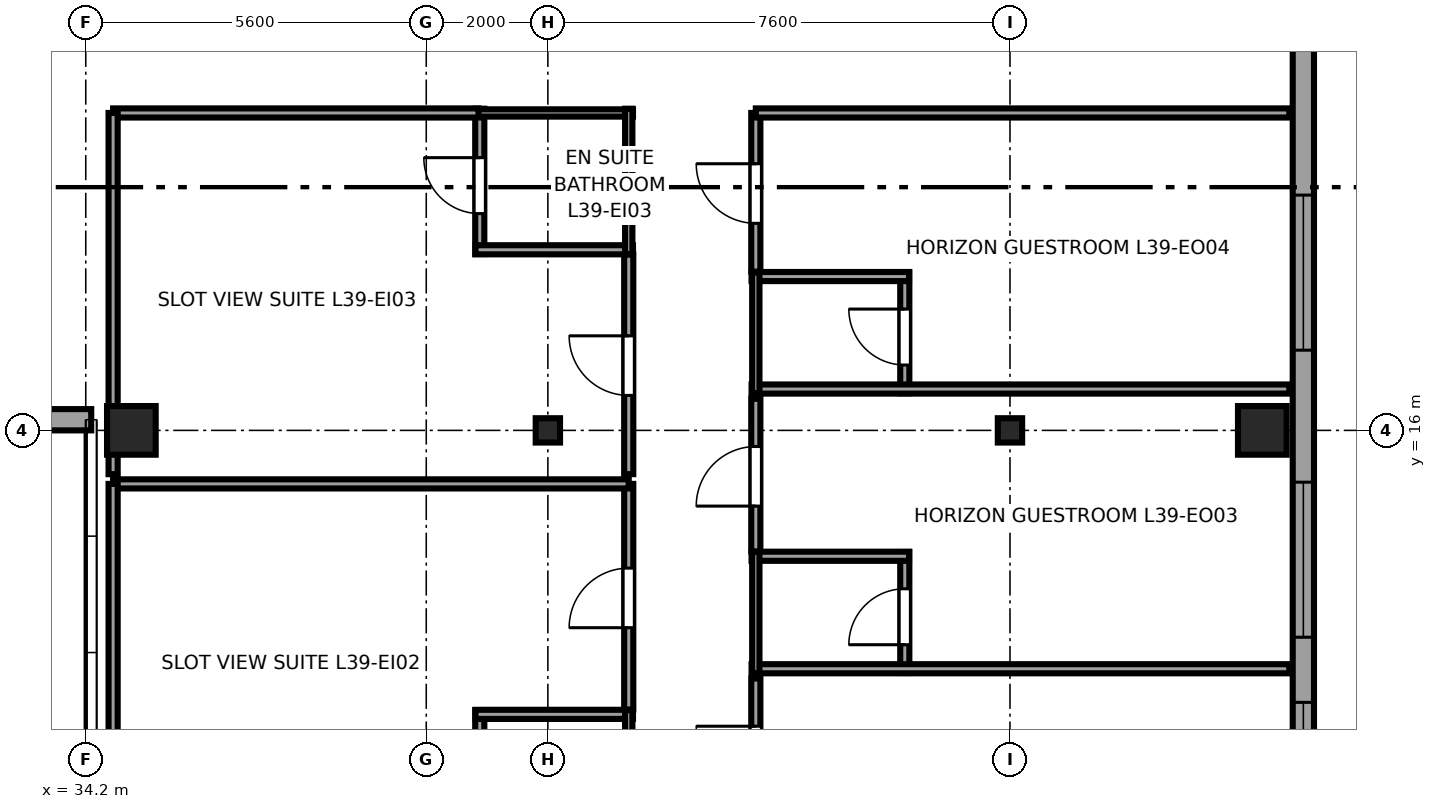
"""IFC4 building model, lengths in metres.
Left out: names, types, materials, properties, quantities, classifications, styles, units other than length and angle.
Written with IfcOpenShell. Run it as: python <this file> out.ifc"""

import sys

from ifc_helpers import new_model, si_unit, direction, frame, frame_2d, origin, origin_2d, place, context, subcontext, project, spatial, rectangle, i_section, extrude, source, transform, mapped, element, fill, save


model = new_model("IFC4")
c1 = context("Model", 3, precision=1e-05, world=origin(), true_north=direction((0.0, 1.0)))
c2 = subcontext(c1, "Body", "Model", "MODEL_VIEW")
j1 = project(units=[si_unit("LENGTHUNIT", "METRE"), si_unit("PLANEANGLEUNIT", "RADIAN")], contexts=[c1])
p1 = place(None, origin())
s1 = spatial("IfcSite", under=j1, at=p1, CompositionType="ELEMENT")
p2 = place(p1, origin())
s2 = spatial("IfcBuilding", under=s1, at=p2, CompositionType="ELEMENT")
p3 = place(p2, frame((0.0, 0.0, 150.6)))
s3 = spatial("IfcBuildingStorey", under=s2, at=p3, CompositionType="ELEMENT", Elevation=150.6)
m1 = source(origin(), c2, "Body", "SweptSolid", [
    extrude(rectangle(XDim=0.8, YDim=0.8, at=origin_2d()), origin(), (0.0, 0.0, 1.0), 3.55),
])
p4 = place(p3, frame((34.95, 16.0, 0.0), z_axis=(0.0, 0.0, 1.0), x_axis=(1.0, 0.0, 0.0)))
e1 = element("IfcColumn", 1, at=p4, inside=s3, PredefinedType="COLUMN", context=c2, shape_type="MappedRepresentation", body=[
    mapped(m1, transform((0.0, 0.0, 0.0), x_axis=(1.0, 0.0, 0.0), y_axis=(0.0, 1.0, 0.0), z_axis=(0.0, 0.0, 1.0), scale=1.0)),
])
m2 = source(origin(), c2, "Body", "SweptSolid", [
    extrude(i_section(OverallWidth=0.4, OverallDepth=0.4, WebThickness=0.02, FlangeThickness=0.035, at=origin_2d()), origin(), (0.0, 0.0, 1.0), 3.55),
])
for number, where, z_axis, x_axis in (
    (2, (41.8, 16.0, 0.0), (0.0, 0.0, 1.0), (1.0, 0.0, 0.0)),
    (3, (49.4, 16.0, 0.0), (0.0, 0.0, 1.0), (1.0, 0.0, 0.0)),
):
    element("IfcColumn", number, at=place(p3, frame(where, z_axis=z_axis, x_axis=x_axis)), inside=s3, PredefinedType="COLUMN", context=c2, shape_type="MappedRepresentation", body=[
        mapped(m2, transform((0.0, 0.0, 0.0), x_axis=(1.0, 0.0, 0.0), y_axis=(0.0, 1.0, 0.0), z_axis=(0.0, 0.0, 1.0), scale=1.0)),
    ])
p5 = place(p3, frame((53.55, 16.0, 0.0), z_axis=(0.0, 0.0, 1.0), x_axis=(1.0, 0.0, 0.0)))
e4 = element("IfcColumn", 4, at=p5, inside=s3, PredefinedType="COLUMN", context=c2, shape_type="MappedRepresentation", body=[
    mapped(m1, transform((0.0, 0.0, 0.0), x_axis=(1.0, 0.0, 0.0), y_axis=(0.0, 1.0, 0.0), z_axis=(0.0, 0.0, 1.0), scale=1.0)),
])
p6 = place(p3, frame((22.71, 16.175, 0.0), z_axis=(0.0, 0.0, 1.0), x_axis=(1.0, 0.0, 0.0)))
e5 = element("IfcWall", 5, at=p6, inside=s3, PredefinedType="SOLIDWALL", context=c2, shape_type="SweptSolid", body=[
    extrude(rectangle(XDim=11.58, YDim=0.35, at=frame_2d((5.79, 0.0))), origin(), (0.0, 0.0, 1.0), 2.16),
])
p7 = place(p3, frame((54.225, 7.017, 0.0), z_axis=(0.0, 0.0, 1.0), x_axis=(0.0, 1.0, 0.0)))
e6 = element("IfcWall", 6, at=p7, inside=s3, PredefinedType="SOLIDWALL", context=c2, shape_type="SweptSolid", body=[
    extrude(rectangle(XDim=34.566, YDim=0.35, at=frame_2d((17.283, 0.0))), origin(), (0.0, 0.0, 1.0), 3.37),
])
p8 = place(p7, frame((1.96, 0.0, 0.68)))
e7 = element("IfcOpeningElement", 7, at=p8, cuts=e6, PredefinedType="OPENING", context=c2, shape_type="SweptSolid", body=[
    extrude(rectangle(XDim=2.55, YDim=1.92, at=frame_2d((1.275, 0.96))), frame((0.0, 0.185, 0.0), z_axis=(0.0, -1.0, 0.0), x_axis=(1.0, 0.0, 0.0)), (0.0, 0.0, 1.0), 0.37),
])
p9 = place(p7, frame((5.581, 0.0, 0.68)))
e8 = element("IfcOpeningElement", 8, at=p9, cuts=e6, PredefinedType="OPENING", context=c2, shape_type="SweptSolid", body=[
    extrude(rectangle(XDim=2.55, YDim=1.92, at=frame_2d((1.275, 0.96))), frame((0.0, 0.185, 0.0), z_axis=(0.0, -1.0, 0.0), x_axis=(1.0, 0.0, 0.0)), (0.0, 0.0, 1.0), 0.37),
])
p10 = place(p7, frame((10.302, 0.0, 0.68)))
e9 = element("IfcOpeningElement", 9, at=p10, cuts=e6, PredefinedType="OPENING", context=c2, shape_type="SweptSolid", body=[
    extrude(rectangle(XDim=2.55, YDim=1.92, at=frame_2d((1.275, 0.96))), frame((0.0, 0.185, 0.0), z_axis=(0.0, -1.0, 0.0), x_axis=(1.0, 0.0, 0.0)), (0.0, 0.0, 1.0), 0.37),
])
p11 = place(p7, frame((22.264, 0.0, 0.68)))
e10 = element("IfcOpeningElement", 10, at=p11, cuts=e6, PredefinedType="OPENING", context=c2, shape_type="SweptSolid", body=[
    extrude(rectangle(XDim=2.55, YDim=1.92, at=frame_2d((1.275, 0.96))), frame((0.0, 0.185, 0.0), z_axis=(0.0, -1.0, 0.0), x_axis=(1.0, 0.0, 0.0)), (0.0, 0.0, 1.0), 0.37),
])
p12 = place(p7, frame((30.605, 0.0, 0.68)))
e11 = element("IfcOpeningElement", 11, at=p12, cuts=e6, PredefinedType="OPENING", context=c2, shape_type="SweptSolid", body=[
    extrude(rectangle(XDim=2.55, YDim=1.92, at=frame_2d((1.275, 0.96))), frame((0.0, 0.185, 0.0), z_axis=(0.0, -1.0, 0.0), x_axis=(1.0, 0.0, 0.0)), (0.0, 0.0, 1.0), 0.37),
])
p13 = place(p3, frame((40.68, 9.01, 0.0), z_axis=(0.0, 0.0, 1.0), x_axis=(0.0, 1.0, 0.0)))
e12 = element("IfcWall", 12, at=p13, inside=s3, PredefinedType="PARTITIONING", context=c2, shape_type="SweptSolid", body=[
    extrude(rectangle(XDim=2.39, YDim=0.15, at=frame_2d((1.195, 0.0))), origin(), (0.0, 0.0, 1.0), 3.37),
])
p14 = place(p13, frame((0.665, 0.0, 0.0)))
e13 = element("IfcOpeningElement", 13, at=p14, cuts=e12, PredefinedType="OPENING", context=c2, shape_type="SweptSolid", body=[
    extrude(rectangle(XDim=0.92, YDim=2.01, at=frame_2d((0.46, 1.005))), frame((0.0, 0.085, 0.0), z_axis=(0.0, -1.0, 0.0), x_axis=(1.0, 0.0, 0.0)), (0.0, 0.0, 1.0), 0.17),
])
p15 = place(p3, frame((40.61, 11.33, 0.0), z_axis=(0.0, 0.0, 1.0), x_axis=(1.0, 0.0, 0.0)))
e14 = element("IfcWall", 14, at=p15, inside=s3, PredefinedType="PARTITIONING", context=c2, shape_type="SweptSolid", body=[
    extrude(rectangle(XDim=2.59, YDim=0.15, at=frame_2d((1.295, 0.0))), origin(), (0.0, 0.0, 1.0), 3.37),
])
p16 = place(p3, frame((43.13, 9.01, 0.0), z_axis=(0.0, 0.0, 1.0), x_axis=(0.0, 1.0, 0.0)))
e15 = element("IfcWall", 15, at=p16, inside=s3, PredefinedType="PLUMBINGWALL", context=c2, shape_type="SweptSolid", body=[
    extrude(rectangle(XDim=2.39, YDim=0.12, at=frame_2d((1.195, 0.0))), origin(), (0.0, 0.0, 1.0), 3.37),
])
p17 = place(p3, frame((40.68, 18.9, 0.0), z_axis=(0.0, 0.0, 1.0), x_axis=(0.0, 1.0, 0.0)))
e16 = element("IfcWall", 16, at=p17, inside=s3, PredefinedType="PARTITIONING", context=c2, shape_type="SweptSolid", body=[
    extrude(rectangle(XDim=2.39, YDim=0.15, at=frame_2d((1.195, 0.0))), origin(), (0.0, 0.0, 1.0), 3.37),
])
p18 = place(p17, frame((0.665, 0.0, 0.0)))
e17 = element("IfcOpeningElement", 17, at=p18, cuts=e16, PredefinedType="OPENING", context=c2, shape_type="SweptSolid", body=[
    extrude(rectangle(XDim=0.92, YDim=2.01, at=frame_2d((0.46, 1.005))), frame((0.0, 0.085, 0.0), z_axis=(0.0, -1.0, 0.0), x_axis=(1.0, 0.0, 0.0)), (0.0, 0.0, 1.0), 0.17),
])
p19 = place(p3, frame((40.61, 18.97, 0.0), z_axis=(0.0, 0.0, 1.0), x_axis=(1.0, 0.0, 0.0)))
e18 = element("IfcWall", 18, at=p19, inside=s3, PredefinedType="PARTITIONING", context=c2, shape_type="SweptSolid", body=[
    extrude(rectangle(XDim=2.59, YDim=0.15, at=frame_2d((1.295, 0.0))), origin(), (0.0, 0.0, 1.0), 3.37),
])
p20 = place(p3, frame((40.61, 21.22, 0.0), z_axis=(0.0, 0.0, 1.0), x_axis=(1.0, 0.0, 0.0)))
e19 = element("IfcWall", 19, at=p20, inside=s3, PredefinedType="PLUMBINGWALL", context=c2, shape_type="SweptSolid", body=[
    extrude(rectangle(XDim=2.59, YDim=0.12, at=frame_2d((1.295, 0.0))), origin(), (0.0, 0.0, 1.0), 3.37),
])
p21 = place(p3, frame((43.13, 18.9, 0.0), z_axis=(0.0, 0.0, 1.0), x_axis=(0.0, 1.0, 0.0)))
e20 = element("IfcWall", 20, at=p21, inside=s3, PredefinedType="PLUMBINGWALL", context=c2, shape_type="SweptSolid", body=[
    extrude(rectangle(XDim=2.39, YDim=0.12, at=frame_2d((1.195, 0.0))), origin(), (0.0, 0.0, 1.0), 3.37),
])
p22 = place(p3, frame((47.67, 12.01, 0.0), z_axis=(0.0, 0.0, 1.0), x_axis=(0.0, 1.0, 0.0)))
e21 = element("IfcWall", 21, at=p22, inside=s3, PredefinedType="PARTITIONING", context=c2, shape_type="SweptSolid", body=[
    extrude(rectangle(XDim=1.99, YDim=0.15, at=frame_2d((0.995, 0.0))), origin(), (0.0, 0.0, 1.0), 3.37),
])
p23 = place(p22, frame((0.465, 0.0, 0.0)))
e22 = element("IfcOpeningElement", 22, at=p23, cuts=e21, PredefinedType="OPENING", context=c2, shape_type="SweptSolid", body=[
    extrude(rectangle(XDim=0.92, YDim=2.01, at=frame_2d((0.46, 1.005))), frame((0.0, 0.085, 0.0), z_axis=(0.0, -1.0, 0.0), x_axis=(1.0, 0.0, 0.0)), (0.0, 0.0, 1.0), 0.17),
])
p24 = place(p3, frame((45.15, 12.08, 0.0), z_axis=(0.0, 0.0, 1.0), x_axis=(1.0, 0.0, 0.0)))
e23 = element("IfcWall", 23, at=p24, inside=s3, PredefinedType="PARTITIONING", context=c2, shape_type="SweptSolid", body=[
    extrude(rectangle(XDim=8.845, YDim=0.15, at=frame_2d((4.423, 0.0))), origin(), (0.0, 0.0, 1.0), 3.37),
])
p25 = place(p3, frame((45.15, 13.93, 0.0), z_axis=(0.0, 0.0, 1.0), x_axis=(1.0, 0.0, 0.0)))
e24 = element("IfcWall", 24, at=p25, inside=s3, PredefinedType="PARTITIONING", context=c2, shape_type="SweptSolid", body=[
    extrude(rectangle(XDim=2.59, YDim=0.15, at=frame_2d((1.295, 0.0))), origin(), (0.0, 0.0, 1.0), 3.37),
])
p26 = place(p3, frame((45.22, 12.01, 0.0), z_axis=(0.0, 0.0, 1.0), x_axis=(0.0, 1.0, 0.0)))
e25 = element("IfcWall", 25, at=p26, inside=s3, PredefinedType="PLUMBINGWALL", context=c2, shape_type="SweptSolid", body=[
    extrude(rectangle(XDim=1.99, YDim=0.12, at=frame_2d((0.995, 0.0))), origin(), (0.0, 0.0, 1.0), 3.37),
])
p27 = place(p3, frame((47.67, 16.61, 0.0), z_axis=(0.0, 0.0, 1.0), x_axis=(0.0, 1.0, 0.0)))
e26 = element("IfcWall", 26, at=p27, inside=s3, PredefinedType="PARTITIONING", context=c2, shape_type="SweptSolid", body=[
    extrude(rectangle(XDim=1.99, YDim=0.15, at=frame_2d((0.995, 0.0))), origin(), (0.0, 0.0, 1.0), 3.37),
])
p28 = place(p27, frame((0.465, 0.0, 0.0)))
e27 = element("IfcOpeningElement", 27, at=p28, cuts=e26, PredefinedType="OPENING", context=c2, shape_type="SweptSolid", body=[
    extrude(rectangle(XDim=0.92, YDim=2.01, at=frame_2d((0.46, 1.005))), frame((0.0, 0.085, 0.0), z_axis=(0.0, -1.0, 0.0), x_axis=(1.0, 0.0, 0.0)), (0.0, 0.0, 1.0), 0.17),
])
p29 = place(p3, frame((45.15, 16.68, 0.0), z_axis=(0.0, 0.0, 1.0), x_axis=(1.0, 0.0, 0.0)))
e28 = element("IfcWall", 28, at=p29, inside=s3, PredefinedType="PARTITIONING", context=c2, shape_type="SweptSolid", body=[
    extrude(rectangle(XDim=8.845, YDim=0.15, at=frame_2d((4.423, 0.0))), origin(), (0.0, 0.0, 1.0), 3.37),
])
p30 = place(p3, frame((45.15, 18.53, 0.0), z_axis=(0.0, 0.0, 1.0), x_axis=(1.0, 0.0, 0.0)))
e29 = element("IfcWall", 29, at=p30, inside=s3, PredefinedType="PARTITIONING", context=c2, shape_type="SweptSolid", body=[
    extrude(rectangle(XDim=2.59, YDim=0.15, at=frame_2d((1.295, 0.0))), origin(), (0.0, 0.0, 1.0), 3.37),
])
p31 = place(p3, frame((45.22, 16.61, 0.0), z_axis=(0.0, 0.0, 1.0), x_axis=(0.0, 1.0, 0.0)))
e30 = element("IfcWall", 30, at=p31, inside=s3, PredefinedType="PLUMBINGWALL", context=c2, shape_type="SweptSolid", body=[
    extrude(rectangle(XDim=1.99, YDim=0.12, at=frame_2d((0.995, 0.0))), origin(), (0.0, 0.0, 1.0), 3.37),
])
p32 = place(p3, frame((43.13, 11.41, 0.0), z_axis=(0.0, 0.0, 1.0), x_axis=(0.0, 1.0, 0.0)))
e31 = element("IfcWall", 31, at=p32, inside=s3, PredefinedType="PARTITIONING", context=c2, shape_type="SweptSolid", body=[
    extrude(rectangle(XDim=3.71, YDim=0.15, at=frame_2d((1.855, 0.0))), origin(), (0.0, 0.0, 1.0), 3.37),
])
p33 = place(p32, frame((1.345, 0.0, 0.0)))
e32 = element("IfcOpeningElement", 32, at=p33, cuts=e31, PredefinedType="OPENING", context=c2, shape_type="SweptSolid", body=[
    extrude(rectangle(XDim=0.98, YDim=2.12, at=frame_2d((0.49, 1.06))), frame((0.0, 0.085, 0.0), z_axis=(0.0, -1.0, 0.0), x_axis=(1.0, 0.0, 0.0)), (0.0, 0.0, 1.0), 0.17),
])
p34 = place(p3, frame((34.65, 15.12, 0.0), z_axis=(0.0, 0.0, 1.0), x_axis=(1.0, 0.0, 0.0)))
e33 = element("IfcWall", 33, at=p34, inside=s3, PredefinedType="PARTITIONING", context=c2, shape_type="SweptSolid", body=[
    extrude(rectangle(XDim=8.48, YDim=0.15, at=frame_2d((4.24, 0.0))), origin(), (0.0, 0.0, 1.0), 3.37),
])
p35 = place(p3, frame((34.65, 9.08, 0.0), z_axis=(0.0, 0.0, 1.0), x_axis=(0.0, 1.0, 0.0)))
e34 = element("IfcWall", 34, at=p35, inside=s3, PredefinedType="PARTITIONING", context=c2, shape_type="SweptSolid", body=[
    extrude(rectangle(XDim=6.04, YDim=0.15, at=frame_2d((3.02, 0.0))), origin(), (0.0, 0.0, 1.0), 2.16),
])
p36 = place(p3, frame((43.13, 15.28, 0.0), z_axis=(0.0, 0.0, 1.0), x_axis=(0.0, 1.0, 0.0)))
e35 = element("IfcWall", 35, at=p36, inside=s3, PredefinedType="PARTITIONING", context=c2, shape_type="SweptSolid", body=[
    extrude(rectangle(XDim=3.61, YDim=0.15, at=frame_2d((1.805, 0.0))), origin(), (0.0, 0.0, 1.0), 3.37),
])
p37 = place(p36, frame((1.295, 0.0, 0.0)))
e36 = element("IfcOpeningElement", 36, at=p37, cuts=e35, PredefinedType="OPENING", context=c2, shape_type="SweptSolid", body=[
    extrude(rectangle(XDim=0.98, YDim=2.12, at=frame_2d((0.49, 1.06))), frame((0.0, 0.085, 0.0), z_axis=(0.0, -1.0, 0.0), x_axis=(1.0, 0.0, 0.0)), (0.0, 0.0, 1.0), 0.17),
])
p38 = place(p3, frame((34.65, 21.22, 0.0), z_axis=(0.0, 0.0, 1.0), x_axis=(1.0, 0.0, 0.0)))
e37 = element("IfcWall", 37, at=p38, inside=s3, PredefinedType="PARTITIONING", context=c2, shape_type="SweptSolid", body=[
    extrude(rectangle(XDim=6.01, YDim=0.15, at=frame_2d((3.005, 0.0))), origin(), (0.0, 0.0, 1.0), 3.37),
])
p39 = place(p3, frame((34.65, 15.28, 0.0), z_axis=(0.0, 0.0, 1.0), x_axis=(0.0, 1.0, 0.0)))
e38 = element("IfcWall", 38, at=p39, inside=s3, PredefinedType="PARTITIONING", context=c2, shape_type="SweptSolid", body=[
    extrude(rectangle(XDim=5.94, YDim=0.15, at=frame_2d((2.97, 0.0))), origin(), (0.0, 0.0, 1.0), 2.16),
])
p40 = place(p3, frame((45.22, 9.41, 0.0), z_axis=(0.0, 0.0, 1.0), x_axis=(0.0, 1.0, 0.0)))
e39 = element("IfcWall", 39, at=p40, inside=s3, PredefinedType="PARTITIONING", context=c2, shape_type="SweptSolid", body=[
    extrude(rectangle(XDim=2.51, YDim=0.15, at=frame_2d((1.255, 0.0))), origin(), (0.0, 0.0, 1.0), 3.37),
])
p41 = place(p40, frame((0.745, 0.0, 0.0)))
e40 = element("IfcOpeningElement", 40, at=p41, cuts=e39, PredefinedType="OPENING", context=c2, shape_type="SweptSolid", body=[
    extrude(rectangle(XDim=0.98, YDim=2.12, at=frame_2d((0.49, 1.06))), frame((0.0, 0.085, 0.0), z_axis=(0.0, -1.0, 0.0), x_axis=(1.0, 0.0, 0.0)), (0.0, 0.0, 1.0), 0.17),
])
p42 = place(p3, frame((45.22, 14.01, 0.0), z_axis=(0.0, 0.0, 1.0), x_axis=(0.0, 1.0, 0.0)))
e41 = element("IfcWall", 41, at=p42, inside=s3, PredefinedType="PARTITIONING", context=c2, shape_type="SweptSolid", body=[
    extrude(rectangle(XDim=2.51, YDim=0.15, at=frame_2d((1.255, 0.0))), origin(), (0.0, 0.0, 1.0), 3.37),
])
p43 = place(p42, frame((0.745, 0.0, 0.0)))
e42 = element("IfcOpeningElement", 42, at=p43, cuts=e41, PredefinedType="OPENING", context=c2, shape_type="SweptSolid", body=[
    extrude(rectangle(XDim=0.98, YDim=2.12, at=frame_2d((0.49, 1.06))), frame((0.0, 0.085, 0.0), z_axis=(0.0, -1.0, 0.0), x_axis=(1.0, 0.0, 0.0)), (0.0, 0.0, 1.0), 0.17),
])
p44 = place(p3, frame((45.22, 18.61, 0.0), z_axis=(0.0, 0.0, 1.0), x_axis=(0.0, 1.0, 0.0)))
e43 = element("IfcWall", 43, at=p44, inside=s3, PredefinedType="PARTITIONING", context=c2, shape_type="SweptSolid", body=[
    extrude(rectangle(XDim=2.61, YDim=0.15, at=frame_2d((1.305, 0.0))), origin(), (0.0, 0.0, 1.0), 3.37),
])
p45 = place(p44, frame((0.795, 0.0, 0.0)))
e44 = element("IfcOpeningElement", 44, at=p45, cuts=e43, PredefinedType="OPENING", context=c2, shape_type="SweptSolid", body=[
    extrude(rectangle(XDim=0.98, YDim=2.12, at=frame_2d((0.49, 1.06))), frame((0.0, 0.085, 0.0), z_axis=(0.0, -1.0, 0.0), x_axis=(1.0, 0.0, 0.0)), (0.0, 0.0, 1.0), 0.17),
])
p46 = place(p3, frame((45.22, 21.22, 0.0), z_axis=(0.0, 0.0, 1.0), x_axis=(1.0, 0.0, 0.0)))
e45 = element("IfcWall", 45, at=p46, inside=s3, PredefinedType="PARTITIONING", context=c2, shape_type="SweptSolid", body=[
    extrude(rectangle(XDim=8.775, YDim=0.15, at=frame_2d((4.388, 0.0))), origin(), (0.0, 0.0, 1.0), 3.37),
])
m3 = source(origin(), c2, "Body", "SweptSolid", [
    extrude(rectangle(XDim=2.55, YDim=1.92, at=frame_2d((1.275, 0.96))), frame((0.0, 0.09, 0.0), z_axis=(0.0, -1.0, 0.0), x_axis=(1.0, 0.0, 0.0)), (0.0, 0.0, 1.0), 0.06),
])
p47 = place(p8, origin())
e46 = element("IfcWindow", 46, at=p47, inside=s3, PartitioningType="TRIPLE_PANEL_HORIZONTAL", PredefinedType="WINDOW", context=c2, shape_type="MappedRepresentation", body=[
    mapped(m3, transform((0.0, 0.0, 0.0), x_axis=(1.0, 0.0, 0.0), y_axis=(0.0, 1.0, 0.0), z_axis=(0.0, 0.0, 1.0), scale=1.0)),
])
fill(e7, e46)
p48 = place(p9, origin())
e47 = element("IfcWindow", 47, at=p48, inside=s3, PartitioningType="TRIPLE_PANEL_HORIZONTAL", PredefinedType="WINDOW", context=c2, shape_type="MappedRepresentation", body=[
    mapped(m3, transform((0.0, 0.0, 0.0), x_axis=(1.0, 0.0, 0.0), y_axis=(0.0, 1.0, 0.0), z_axis=(0.0, 0.0, 1.0), scale=1.0)),
])
fill(e8, e47)
p49 = place(p10, origin())
e48 = element("IfcWindow", 48, at=p49, inside=s3, PartitioningType="TRIPLE_PANEL_HORIZONTAL", PredefinedType="WINDOW", context=c2, shape_type="MappedRepresentation", body=[
    mapped(m3, transform((0.0, 0.0, 0.0), x_axis=(1.0, 0.0, 0.0), y_axis=(0.0, 1.0, 0.0), z_axis=(0.0, 0.0, 1.0), scale=1.0)),
])
fill(e9, e48)
m4 = source(origin(), c2, "Body", "SweptSolid", [
    extrude(rectangle(XDim=0.92, YDim=2.01, at=frame_2d((0.46, 1.005))), frame((0.0, 0.025, 0.0), z_axis=(0.0, -1.0, 0.0), x_axis=(1.0, 0.0, 0.0)), (0.0, 0.0, 1.0), 0.05),
])
p50 = place(p18, origin())
e49 = element("IfcDoor", 49, at=p50, inside=s3, OperationType="SINGLE_SWING_RIGHT", PredefinedType="DOOR", context=c2, shape_type="MappedRepresentation", body=[
    mapped(m4, transform((0.0, 0.0, 0.0), x_axis=(1.0, 0.0, 0.0), y_axis=(0.0, 1.0, 0.0), z_axis=(0.0, 0.0, 1.0), scale=1.0)),
])
fill(e17, e49)
p51 = place(p23, origin())
e50 = element("IfcDoor", 50, at=p51, inside=s3, OperationType="SINGLE_SWING_LEFT", PredefinedType="DOOR", context=c2, shape_type="MappedRepresentation", body=[
    mapped(m4, transform((0.0, 0.0, 0.0), x_axis=(1.0, 0.0, 0.0), y_axis=(0.0, 1.0, 0.0), z_axis=(0.0, 0.0, 1.0), scale=1.0)),
])
fill(e22, e50)
p52 = place(p28, origin())
e51 = element("IfcDoor", 51, at=p52, inside=s3, OperationType="SINGLE_SWING_RIGHT", PredefinedType="DOOR", context=c2, shape_type="MappedRepresentation", body=[
    mapped(m4, transform((0.0, 0.0, 0.0), x_axis=(1.0, 0.0, 0.0), y_axis=(0.0, 1.0, 0.0), z_axis=(0.0, 0.0, 1.0), scale=1.0)),
])
fill(e27, e51)
m5 = source(origin(), c2, "Body", "SweptSolid", [
    extrude(rectangle(XDim=0.98, YDim=2.12, at=frame_2d((0.49, 1.06))), frame((0.0, 0.025, 0.0), z_axis=(0.0, -1.0, 0.0), x_axis=(1.0, 0.0, 0.0)), (0.0, 0.0, 1.0), 0.05),
])
p53 = place(p33, origin())
e52 = element("IfcDoor", 52, at=p53, inside=s3, OperationType="SINGLE_SWING_LEFT", PredefinedType="DOOR", context=c2, shape_type="MappedRepresentation", body=[
    mapped(m5, transform((0.0, 0.0, 0.0), x_axis=(1.0, 0.0, 0.0), y_axis=(0.0, 1.0, 0.0), z_axis=(0.0, 0.0, 1.0), scale=1.0)),
])
fill(e32, e52)
p54 = place(p37, origin())
e53 = element("IfcDoor", 53, at=p54, inside=s3, OperationType="SINGLE_SWING_RIGHT", PredefinedType="DOOR", context=c2, shape_type="MappedRepresentation", body=[
    mapped(m5, transform((0.0, 0.0, 0.0), x_axis=(1.0, 0.0, 0.0), y_axis=(0.0, 1.0, 0.0), z_axis=(0.0, 0.0, 1.0), scale=1.0)),
])
fill(e36, e53)
p55 = place(p41, origin())
e54 = element("IfcDoor", 54, at=p55, inside=s3, OperationType="SINGLE_SWING_RIGHT", PredefinedType="DOOR", context=c2, shape_type="MappedRepresentation", body=[
    mapped(m5, transform((0.0, 0.0, 0.0), x_axis=(1.0, 0.0, 0.0), y_axis=(0.0, 1.0, 0.0), z_axis=(0.0, 0.0, 1.0), scale=1.0)),
])
fill(e40, e54)
p56 = place(p43, origin())
e55 = element("IfcDoor", 55, at=p56, inside=s3, OperationType="SINGLE_SWING_LEFT", PredefinedType="DOOR", context=c2, shape_type="MappedRepresentation", body=[
    mapped(m5, transform((0.0, 0.0, 0.0), x_axis=(1.0, 0.0, 0.0), y_axis=(0.0, 1.0, 0.0), z_axis=(0.0, 0.0, 1.0), scale=1.0)),
])
fill(e42, e55)
p57 = place(p45, origin())
e56 = element("IfcDoor", 56, at=p57, inside=s3, OperationType="SINGLE_SWING_RIGHT", PredefinedType="DOOR", context=c2, shape_type="MappedRepresentation", body=[
    mapped(m5, transform((0.0, 0.0, 0.0), x_axis=(1.0, 0.0, 0.0), y_axis=(0.0, 1.0, 0.0), z_axis=(0.0, 0.0, 1.0), scale=1.0)),
])
fill(e44, e56)
save(model, sys.argv[1])
